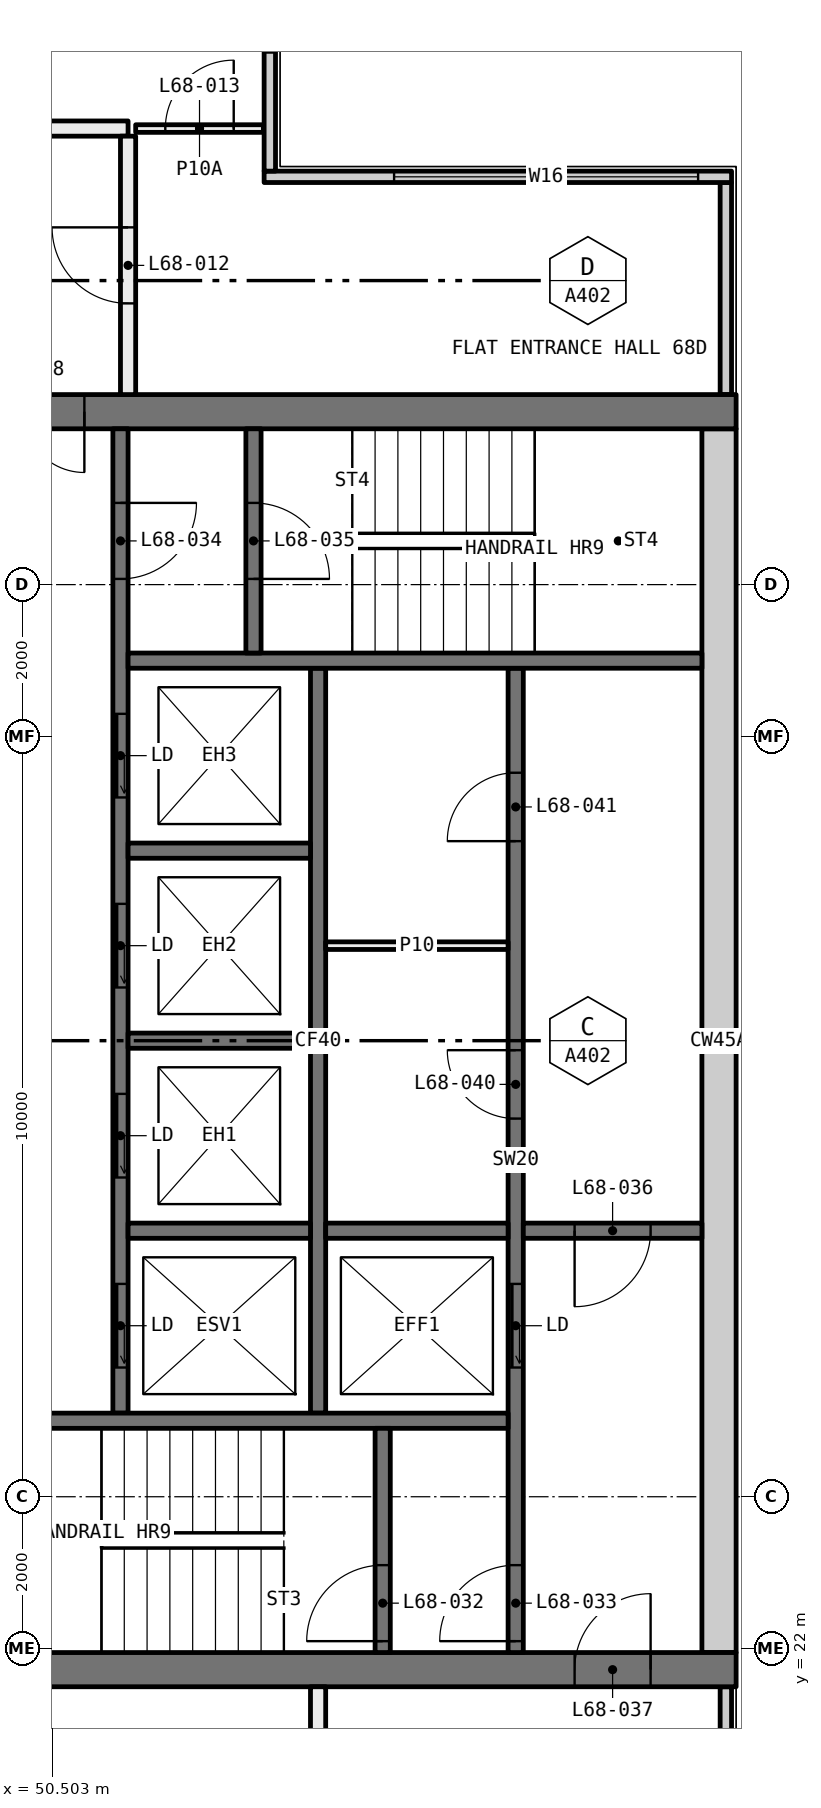
"""IFC4 building model, lengths in metres.
Left out: names, types, materials, properties, quantities, classifications, styles, units other than length and angle.
Written with IfcOpenShell. Run it as: python <this file> out.ifc"""

import sys

from ifc_helpers import new_model, si_unit, direction, frame, frame_2d, origin, place, context, subcontext, project, spatial, rectangle, extrude, element, fill, save


model = new_model("IFC4")
c1 = context("Model", 3, precision=1e-05, world=origin(), true_north=direction((0.0, 1.0)))
c2 = subcontext(c1, "Body", "Model", "MODEL_VIEW")
j1 = project(units=[si_unit("LENGTHUNIT", "METRE"), si_unit("PLANEANGLEUNIT", "RADIAN")], contexts=[c1])
p1 = place(None, origin())
s1 = spatial("IfcSite", under=j1, at=p1, CompositionType="ELEMENT")
p2 = place(p1, origin())
s2 = spatial("IfcBuilding", under=s1, at=p2, CompositionType="ELEMENT")
p3 = place(p2, frame((0.0, 0.0, 252.45)))
s3 = spatial("IfcBuildingStorey", under=s2, at=p3, CompositionType="ELEMENT", Elevation=252.45)
for number, where, z_axis, x_axis in (
    (1, (59.365, 18.71, 0.0), (0.0, 0.0, 1.0), (0.0, 1.0, 0.0)),
    (2, (59.365, 38.5, 0.0), (0.0, 0.0, 1.0), (0.0, 1.0, 0.0)),
):
    element("IfcWall", number, at=place(p3, frame(where, z_axis=z_axis, x_axis=x_axis)), inside=s3, PredefinedType="ELEMENTEDWALL", context=c2, shape_type="SweptSolid", body=[
        extrude(rectangle(XDim=2.79, YDim=0.15, at=frame_2d((1.395, 0.0))), origin(), (0.0, 0.0, 1.0), 3.05),
    ])
p4 = place(p3, frame((53.29, 41.365, 0.0), z_axis=(0.0, 0.0, 1.0), x_axis=(1.0, 0.0, 0.0)))
e3 = element("IfcWall", 3, at=p4, inside=s3, PredefinedType="ELEMENTEDWALL", context=c2, shape_type="SweptSolid", body=[
    extrude(rectangle(XDim=6.15, YDim=0.15, at=frame_2d((3.075, 0.0))), origin(), (0.0, 0.0, 1.0), 3.05),
])
p5 = place(p4, frame((1.71, 0.0, 0.45)))
e4 = element("IfcOpeningElement", 4, at=p5, cuts=e3, PredefinedType="OPENING", context=c2, shape_type="SweptSolid", body=[
    extrude(rectangle(XDim=4.0, YDim=2.55, at=frame_2d((2.0, 1.275))), frame((0.0, 0.085, 0.0), z_axis=(0.0, -1.0, 0.0), x_axis=(1.0, 0.0, 0.0)), (0.0, 0.0, 1.0), 0.17),
])
p6 = place(p3, frame((53.365, 41.44, 0.0), z_axis=(0.0, 0.0, 1.0), x_axis=(0.0, 1.0, 0.0)))
e5 = element("IfcWall", 5, at=p6, inside=s3, PredefinedType="ELEMENTEDWALL", context=c2, shape_type="SweptSolid", body=[
    extrude(rectangle(XDim=5.85, YDim=0.15, at=frame_2d((2.925, 0.0))), origin(), (0.0, 0.0, 1.0), 3.05),
])
p7 = place(p6, frame((1.56, 0.0, 0.45)))
e6 = element("IfcOpeningElement", 6, at=p7, cuts=e5, PredefinedType="OPENING", context=c2, shape_type="SweptSolid", body=[
    extrude(rectangle(XDim=4.0, YDim=2.55, at=frame_2d((2.0, 1.275))), frame((0.0, 0.085, 0.0), z_axis=(0.0, -1.0, 0.0), x_axis=(1.0, 0.0, 0.0)), (0.0, 0.0, 1.0), 0.17),
])
p8 = place(p3, frame((54.0, 18.72, 0.0), z_axis=(0.0, 0.0, 1.0), x_axis=(0.0, 1.0, 0.0)))
e7 = element("IfcWall", 7, at=p8, inside=s3, PredefinedType="PARTITIONING", context=c2, shape_type="SweptSolid", body=[
    extrude(rectangle(XDim=2.78, YDim=0.2, at=frame_2d((1.39, 0.0))), origin(), (0.0, 0.0, 1.0), 3.05),
])
p9 = place(p8, frame((0.89, 0.0, 0.0)))
e8 = element("IfcOpeningElement", 8, at=p9, cuts=e7, PredefinedType="OPENING", context=c2, shape_type="SweptSolid", body=[
    extrude(rectangle(XDim=1.0, YDim=2.1, at=frame_2d((0.5, 1.05))), frame((0.0, 0.11, 0.0), z_axis=(0.0, -1.0, 0.0), x_axis=(1.0, 0.0, 0.0)), (0.0, 0.0, 1.0), 0.22),
])
p10 = place(p3, frame((51.6, 42.0, 0.0), z_axis=(0.0, 0.0, 1.0), x_axis=(1.0, 0.0, 0.0)))
e9 = element("IfcWall", 9, at=p10, inside=s3, PredefinedType="PARTITIONING", context=c2, shape_type="SweptSolid", body=[
    extrude(rectangle(XDim=1.68, YDim=0.1, at=frame_2d((0.84, 0.0))), origin(), (0.0, 0.0, 1.0), 3.05),
])
p11 = place(p10, frame((0.39, 0.0, 0.0)))
e10 = element("IfcOpeningElement", 10, at=p11, cuts=e9, PredefinedType="OPENING", context=c2, shape_type="SweptSolid", body=[
    extrude(rectangle(XDim=0.9, YDim=2.1, at=frame_2d((0.45, 1.05))), frame((0.0, 0.06, 0.0), z_axis=(0.0, -1.0, 0.0), x_axis=(1.0, 0.0, 0.0)), (0.0, 0.0, 1.0), 0.12),
])
p12 = place(p3, frame((48.0, 42.0, 0.0), z_axis=(0.0, 0.0, 1.0), x_axis=(1.0, 0.0, 0.0)))
e11 = element("IfcWall", 11, at=p12, inside=s3, PredefinedType="PARTITIONING", context=c2, shape_type="SweptSolid", body=[
    extrude(rectangle(XDim=3.5, YDim=0.2, at=frame_2d((1.75, 0.0))), origin(), (0.0, 0.0, 1.0), 3.05),
])
p13 = place(p3, frame((51.5, 41.9, 0.0), z_axis=(0.0, 0.0, 1.0), x_axis=(0.0, -1.0, 0.0)))
e12 = element("IfcWall", 12, at=p13, inside=s3, PredefinedType="PARTITIONING", context=c2, shape_type="SweptSolid", body=[
    extrude(rectangle(XDim=3.4, YDim=0.2, at=frame_2d((1.7, 0.0))), origin(), (0.0, 0.0, 1.0), 3.05),
])
p14 = place(p13, frame((1.2, 0.0, 0.0)))
e13 = element("IfcOpeningElement", 13, at=p14, cuts=e12, PredefinedType="OPENING", context=c2, shape_type="SweptSolid", body=[
    extrude(rectangle(XDim=1.0, YDim=2.1, at=frame_2d((0.5, 1.05))), frame((0.0, 0.11, 0.0), z_axis=(0.0, -1.0, 0.0), x_axis=(1.0, 0.0, 0.0)), (0.0, 0.0, 1.0), 0.22),
])
p15 = place(p3, frame((59.5, 21.725, 0.0), z_axis=(0.0, 0.0, 1.0), x_axis=(-1.0, 0.0, 0.0)))
e14 = element("IfcWall", 14, at=p15, inside=s3, PredefinedType="SHEAR", context=c2, shape_type="SweptSolid", body=[
    extrude(rectangle(XDim=11.0, YDim=0.45, at=frame_2d((5.5, 0.0))), origin(), (0.0, 0.0, 1.0), 3.05),
])
p16 = place(p15, frame((1.125, 0.0, 0.0)))
e15 = element("IfcOpeningElement", 15, at=p16, cuts=e14, PredefinedType="OPENING", context=c2, shape_type="SweptSolid", body=[
    extrude(rectangle(XDim=1.0, YDim=2.1, at=frame_2d((0.5, 1.05))), frame((0.0, 0.235, 0.0), z_axis=(0.0, -1.0, 0.0), x_axis=(1.0, 0.0, 0.0)), (0.0, 0.0, 1.0), 0.47),
])
p17 = place(p3, frame((59.5, 38.275, 0.0), z_axis=(0.0, 0.0, 1.0), x_axis=(-1.0, 0.0, 0.0)))
e16 = element("IfcWall", 16, at=p17, inside=s3, PredefinedType="SHEAR", context=c2, shape_type="SweptSolid", body=[
    extrude(rectangle(XDim=11.0, YDim=0.45, at=frame_2d((5.5, 0.0))), origin(), (0.0, 0.0, 1.0), 3.05),
])
p18 = place(p17, frame((8.575, 0.0, 0.0)))
e17 = element("IfcOpeningElement", 17, at=p18, cuts=e16, PredefinedType="OPENING", context=c2, shape_type="SweptSolid", body=[
    extrude(rectangle(XDim=1.6, YDim=2.1, at=frame_2d((0.8, 1.05))), frame((0.0, 0.235, 0.0), z_axis=(0.0, -1.0, 0.0), x_axis=(1.0, 0.0, 0.0)), (0.0, 0.0, 1.0), 0.47),
])
p19 = place(p3, frame((59.275, 21.95, 0.0), z_axis=(0.0, 0.0, 1.0), x_axis=(0.0, 1.0, 0.0)))
e18 = element("IfcWall", 18, at=p19, inside=s3, PredefinedType="SHEAR", context=c2, shape_type="SweptSolid", body=[
    extrude(rectangle(XDim=16.1, YDim=0.45, at=frame_2d((8.05, 0.0))), origin(), (0.0, 0.0, 1.0), 3.05),
])
p20 = place(p3, frame((56.6, 21.95, 0.0), z_axis=(0.0, 0.0, 1.0), x_axis=(0.0, 1.0, 0.0)))
e19 = element("IfcWall", 19, at=p20, inside=s3, PredefinedType="SOLIDWALL", context=c2, shape_type="SweptSolid", body=[
    extrude(rectangle(XDim=12.95, YDim=0.2, at=frame_2d((6.475, 0.0))), origin(), (0.0, 0.0, 1.0), 3.05),
])
p21 = place(p20, frame((3.75, 0.0, 0.0)))
e20 = element("IfcOpeningElement", 20, at=p21, cuts=e19, PredefinedType="OPENING", context=c2, shape_type="SweptSolid", body=[
    extrude(rectangle(XDim=1.1, YDim=2.1, at=frame_2d((0.55, 1.05))), frame((0.0, 0.11, 0.0), z_axis=(0.0, -1.0, 0.0), x_axis=(1.0, 0.0, 0.0)), (0.0, 0.0, 1.0), 0.22),
])
p22 = place(p20, frame((0.15, 0.0, 0.0)))
e21 = element("IfcOpeningElement", 21, at=p22, cuts=e19, PredefinedType="OPENING", context=c2, shape_type="SweptSolid", body=[
    extrude(rectangle(XDim=1.0, YDim=2.1, at=frame_2d((0.5, 1.05))), frame((0.0, 0.11, 0.0), z_axis=(0.0, -1.0, 0.0), x_axis=(1.0, 0.0, 0.0)), (0.0, 0.0, 1.0), 0.22),
])
p23 = place(p20, frame((7.025, 0.0, 0.0)))
e22 = element("IfcOpeningElement", 22, at=p23, cuts=e19, PredefinedType="OPENING", context=c2, shape_type="SweptSolid", body=[
    extrude(rectangle(XDim=0.9, YDim=2.1, at=frame_2d((0.45, 1.05))), frame((0.0, 0.11, 0.0), z_axis=(0.0, -1.0, 0.0), x_axis=(1.0, 0.0, 0.0)), (0.0, 0.0, 1.0), 0.22),
])
p24 = place(p20, frame((10.675, 0.0, 0.0)))
e23 = element("IfcOpeningElement", 23, at=p24, cuts=e19, PredefinedType="OPENING", context=c2, shape_type="SweptSolid", body=[
    extrude(rectangle(XDim=0.9, YDim=2.1, at=frame_2d((0.45, 1.05))), frame((0.0, 0.11, 0.0), z_axis=(0.0, -1.0, 0.0), x_axis=(1.0, 0.0, 0.0)), (0.0, 0.0, 1.0), 0.22),
])
p25 = place(p3, frame((51.4, 25.1, 0.0), z_axis=(0.0, 0.0, 1.0), x_axis=(0.0, 1.0, 0.0)))
e24 = element("IfcWall", 24, at=p25, inside=s3, PredefinedType="SOLIDWALL", context=c2, shape_type="SweptSolid", body=[
    extrude(rectangle(XDim=12.95, YDim=0.2, at=frame_2d((6.475, 0.0))), origin(), (0.0, 0.0, 1.0), 3.05),
])
p26 = place(p25, frame((0.6, 0.0, 0.0)))
e25 = element("IfcOpeningElement", 25, at=p26, cuts=e24, PredefinedType="OPENING", context=c2, shape_type="SweptSolid", body=[
    extrude(rectangle(XDim=1.1, YDim=2.1, at=frame_2d((0.55, 1.05))), frame((0.0, 0.11, 0.0), z_axis=(0.0, -1.0, 0.0), x_axis=(1.0, 0.0, 0.0)), (0.0, 0.0, 1.0), 0.22),
])
p27 = place(p25, frame((3.1, 0.0, 0.0)))
e26 = element("IfcOpeningElement", 26, at=p27, cuts=e24, PredefinedType="OPENING", context=c2, shape_type="SweptSolid", body=[
    extrude(rectangle(XDim=1.1, YDim=2.1, at=frame_2d((0.55, 1.05))), frame((0.0, 0.11, 0.0), z_axis=(0.0, -1.0, 0.0), x_axis=(1.0, 0.0, 0.0)), (0.0, 0.0, 1.0), 0.22),
])
p28 = place(p25, frame((5.6, 0.0, 0.0)))
e27 = element("IfcOpeningElement", 27, at=p28, cuts=e24, PredefinedType="OPENING", context=c2, shape_type="SweptSolid", body=[
    extrude(rectangle(XDim=1.1, YDim=2.1, at=frame_2d((0.55, 1.05))), frame((0.0, 0.11, 0.0), z_axis=(0.0, -1.0, 0.0), x_axis=(1.0, 0.0, 0.0)), (0.0, 0.0, 1.0), 0.22),
])
p29 = place(p25, frame((8.1, 0.0, 0.0)))
e28 = element("IfcOpeningElement", 28, at=p29, cuts=e24, PredefinedType="OPENING", context=c2, shape_type="SweptSolid", body=[
    extrude(rectangle(XDim=1.1, YDim=2.1, at=frame_2d((0.55, 1.05))), frame((0.0, 0.11, 0.0), z_axis=(0.0, -1.0, 0.0), x_axis=(1.0, 0.0, 0.0)), (0.0, 0.0, 1.0), 0.22),
])
p30 = place(p25, frame((10.975, 0.0, 0.0)))
e29 = element("IfcOpeningElement", 29, at=p30, cuts=e24, PredefinedType="OPENING", context=c2, shape_type="SweptSolid", body=[
    extrude(rectangle(XDim=1.0, YDim=2.1, at=frame_2d((0.5, 1.05))), frame((0.0, 0.11, 0.0), z_axis=(0.0, -1.0, 0.0), x_axis=(1.0, 0.0, 0.0)), (0.0, 0.0, 1.0), 0.22),
])
p31 = place(p3, frame((54.0, 25.1, 0.0), z_axis=(0.0, 0.0, 1.0), x_axis=(0.0, 1.0, 0.0)))
e30 = element("IfcWall", 30, at=p31, inside=s3, PredefinedType="SOLIDWALL", context=c2, shape_type="SweptSolid", body=[
    extrude(rectangle(XDim=9.8, YDim=0.2, at=frame_2d((4.9, 0.0))), origin(), (0.0, 0.0, 1.0), 3.05),
])
for number, where, z_axis, x_axis in (
    (31, (56.5, 25.0, 0.0), (0.0, 0.0, 1.0), (-1.0, 0.0, 0.0)),
    (32, (59.05, 35.0, 0.0), (0.0, 0.0, 1.0), (-1.0, 0.0, 0.0)),
):
    element("IfcWall", number, at=place(p3, frame(where, z_axis=z_axis, x_axis=x_axis)), inside=s3, PredefinedType="SOLIDWALL", context=c2, shape_type="SweptSolid", body=[
        extrude(rectangle(XDim=7.55, YDim=0.2, at=frame_2d((3.775, 0.0))), origin(), (0.0, 0.0, 1.0), 3.05),
    ])
p32 = place(p3, frame((59.05, 27.5, 0.0), z_axis=(0.0, 0.0, 1.0), x_axis=(-1.0, 0.0, 0.0)))
e33 = element("IfcWall", 33, at=p32, inside=s3, PredefinedType="SOLIDWALL", context=c2, shape_type="SweptSolid", body=[
    extrude(rectangle(XDim=2.35, YDim=0.2, at=frame_2d((1.175, 0.0))), origin(), (0.0, 0.0, 1.0), 3.05),
])
p33 = place(p32, frame((0.675, 0.0, 0.0)))
e34 = element("IfcOpeningElement", 34, at=p33, cuts=e33, PredefinedType="OPENING", context=c2, shape_type="SweptSolid", body=[
    extrude(rectangle(XDim=1.0, YDim=2.1, at=frame_2d((0.5, 1.05))), frame((0.0, 0.11, 0.0), z_axis=(0.0, -1.0, 0.0), x_axis=(1.0, 0.0, 0.0)), (0.0, 0.0, 1.0), 0.22),
])
p34 = place(p3, frame((54.85, 21.95, 0.0), z_axis=(0.0, 0.0, 1.0), x_axis=(0.0, 1.0, 0.0)))
e35 = element("IfcWall", 35, at=p34, inside=s3, PredefinedType="SOLIDWALL", context=c2, shape_type="SweptSolid", body=[
    extrude(rectangle(XDim=2.95, YDim=0.2, at=frame_2d((1.475, 0.0))), origin(), (0.0, 0.0, 1.0), 3.05),
])
p35 = place(p34, frame((0.15, 0.0, 0.0)))
e36 = element("IfcOpeningElement", 36, at=p35, cuts=e35, PredefinedType="OPENING", context=c2, shape_type="SweptSolid", body=[
    extrude(rectangle(XDim=1.0, YDim=2.1, at=frame_2d((0.5, 1.05))), frame((0.0, 0.11, 0.0), z_axis=(0.0, -1.0, 0.0), x_axis=(1.0, 0.0, 0.0)), (0.0, 0.0, 1.0), 0.22),
])
p36 = place(p3, frame((53.15, 35.1, 0.0), z_axis=(0.0, 0.0, 1.0), x_axis=(0.0, 1.0, 0.0)))
e37 = element("IfcWall", 37, at=p36, inside=s3, PredefinedType="SOLIDWALL", context=c2, shape_type="SweptSolid", body=[
    extrude(rectangle(XDim=2.95, YDim=0.2, at=frame_2d((1.475, 0.0))), origin(), (0.0, 0.0, 1.0), 3.05),
])
p37 = place(p36, frame((0.975, 0.0, 0.0)))
e38 = element("IfcOpeningElement", 38, at=p37, cuts=e37, PredefinedType="OPENING", context=c2, shape_type="SweptSolid", body=[
    extrude(rectangle(XDim=1.0, YDim=2.1, at=frame_2d((0.5, 1.05))), frame((0.0, 0.11, 0.0), z_axis=(0.0, -1.0, 0.0), x_axis=(1.0, 0.0, 0.0)), (0.0, 0.0, 1.0), 0.22),
])
for number, where, z_axis, x_axis in (
    (39, (56.5, 27.5, 0.0), (0.0, 0.0, 1.0), (-1.0, 0.0, 0.0)),
    (40, (53.9, 27.5, 0.0), (0.0, 0.0, 1.0), (-1.0, 0.0, 0.0)),
    (41, (53.9, 30.0, 0.0), (0.0, 0.0, 1.0), (-1.0, 0.0, 0.0)),
    (42, (53.9, 32.5, 0.0), (0.0, 0.0, 1.0), (-1.0, 0.0, 0.0)),
):
    element("IfcWall", number, at=place(p3, frame(where, z_axis=z_axis, x_axis=x_axis)), inside=s3, PredefinedType="SOLIDWALL", context=c2, shape_type="SweptSolid", body=[
        extrude(rectangle(XDim=2.4, YDim=0.2, at=frame_2d((1.2, 0.0))), origin(), (0.0, 0.0, 1.0), 3.05),
    ])
p38 = place(p3, frame((56.5, 31.25, 0.0), z_axis=(0.0, 0.0, 1.0), x_axis=(-1.0, 0.0, 0.0)))
e43 = element("IfcWall", 43, at=p38, inside=s3, PredefinedType="PARTITIONING", context=c2, shape_type="SweptSolid", body=[
    extrude(rectangle(XDim=2.4, YDim=0.1, at=frame_2d((1.2, 0.0))), origin(), (0.0, 0.0, 1.0), 3.05),
])
p39 = place(p5, origin())
e44 = element("IfcWindow", 44, at=p39, inside=s3, PartitioningType="SINGLE_PANEL", PredefinedType="WINDOW", context=c2, shape_type="SweptSolid", body=[
    extrude(rectangle(XDim=4.0, YDim=2.55, at=frame_2d((2.0, 1.275))), frame((0.0, 0.03, 0.0), z_axis=(0.0, -1.0, 0.0), x_axis=(1.0, 0.0, 0.0)), (0.0, 0.0, 1.0), 0.06),
])
fill(e4, e44)
p40 = place(p14, frame((1.0, 0.0, 0.0), x_axis=(-1.0, 0.0, 0.0)))
e45 = element("IfcDoor", 45, at=p40, inside=s3, OperationType="SINGLE_SWING_LEFT", PredefinedType="DOOR", context=c2, shape_type="SweptSolid", body=[
    extrude(rectangle(XDim=1.0, YDim=2.1, at=frame_2d((0.5, 1.05))), frame((0.0, 0.025, 0.0), z_axis=(0.0, -1.0, 0.0), x_axis=(1.0, 0.0, 0.0)), (0.0, 0.0, 1.0), 0.05),
])
fill(e13, e45)
p41 = place(p11, origin())
e46 = element("IfcDoor", 46, at=p41, inside=s3, OperationType="SINGLE_SWING_LEFT", PredefinedType="DOOR", context=c2, shape_type="SweptSolid", body=[
    extrude(rectangle(XDim=0.9, YDim=2.1, at=frame_2d((0.45, 1.05))), frame((0.0, 0.025, 0.0), z_axis=(0.0, -1.0, 0.0), x_axis=(1.0, 0.0, 0.0)), (0.0, 0.0, 1.0), 0.05),
])
fill(e10, e46)
p42 = place(p26, origin())
e47 = element("IfcDoor", 47, at=p42, inside=s3, OperationType="SLIDING_TO_LEFT", PredefinedType="DOOR", context=c2, shape_type="SweptSolid", body=[
    extrude(rectangle(XDim=1.1, YDim=2.1, at=frame_2d((0.55, 1.05))), frame((0.0, 0.025, 0.0), z_axis=(0.0, -1.0, 0.0), x_axis=(1.0, 0.0, 0.0)), (0.0, 0.0, 1.0), 0.05),
])
fill(e25, e47)
p43 = place(p27, origin())
e48 = element("IfcDoor", 48, at=p43, inside=s3, OperationType="SLIDING_TO_LEFT", PredefinedType="DOOR", context=c2, shape_type="SweptSolid", body=[
    extrude(rectangle(XDim=1.1, YDim=2.1, at=frame_2d((0.55, 1.05))), frame((0.0, 0.025, 0.0), z_axis=(0.0, -1.0, 0.0), x_axis=(1.0, 0.0, 0.0)), (0.0, 0.0, 1.0), 0.05),
])
fill(e26, e48)
p44 = place(p28, origin())
e49 = element("IfcDoor", 49, at=p44, inside=s3, OperationType="SLIDING_TO_LEFT", PredefinedType="DOOR", context=c2, shape_type="SweptSolid", body=[
    extrude(rectangle(XDim=1.1, YDim=2.1, at=frame_2d((0.55, 1.05))), frame((0.0, 0.025, 0.0), z_axis=(0.0, -1.0, 0.0), x_axis=(1.0, 0.0, 0.0)), (0.0, 0.0, 1.0), 0.05),
])
fill(e27, e49)
p45 = place(p29, origin())
e50 = element("IfcDoor", 50, at=p45, inside=s3, OperationType="SLIDING_TO_LEFT", PredefinedType="DOOR", context=c2, shape_type="SweptSolid", body=[
    extrude(rectangle(XDim=1.1, YDim=2.1, at=frame_2d((0.55, 1.05))), frame((0.0, 0.025, 0.0), z_axis=(0.0, -1.0, 0.0), x_axis=(1.0, 0.0, 0.0)), (0.0, 0.0, 1.0), 0.05),
])
fill(e28, e50)
p46 = place(p21, origin())
e51 = element("IfcDoor", 51, at=p46, inside=s3, OperationType="SLIDING_TO_LEFT", PredefinedType="DOOR", context=c2, shape_type="SweptSolid", body=[
    extrude(rectangle(XDim=1.1, YDim=2.1, at=frame_2d((0.55, 1.05))), frame((0.0, 0.025, 0.0), z_axis=(0.0, -1.0, 0.0), x_axis=(1.0, 0.0, 0.0)), (0.0, 0.0, 1.0), 0.05),
])
fill(e20, e51)
p47 = place(p35, origin())
e52 = element("IfcDoor", 52, at=p47, inside=s3, OperationType="SINGLE_SWING_RIGHT", PredefinedType="DOOR", context=c2, shape_type="SweptSolid", body=[
    extrude(rectangle(XDim=1.0, YDim=2.1, at=frame_2d((0.5, 1.05))), frame((0.0, 0.025, 0.0), z_axis=(0.0, -1.0, 0.0), x_axis=(1.0, 0.0, 0.0)), (0.0, 0.0, 1.0), 0.05),
])
fill(e36, e52)
p48 = place(p22, origin())
e53 = element("IfcDoor", 53, at=p48, inside=s3, OperationType="SINGLE_SWING_RIGHT", PredefinedType="DOOR", context=c2, shape_type="SweptSolid", body=[
    extrude(rectangle(XDim=1.0, YDim=2.1, at=frame_2d((0.5, 1.05))), frame((0.0, 0.025, 0.0), z_axis=(0.0, -1.0, 0.0), x_axis=(1.0, 0.0, 0.0)), (0.0, 0.0, 1.0), 0.05),
])
fill(e21, e53)
p49 = place(p30, frame((1.0, 0.0, 0.0), x_axis=(-1.0, 0.0, 0.0)))
e54 = element("IfcDoor", 54, at=p49, inside=s3, OperationType="SINGLE_SWING_RIGHT", PredefinedType="DOOR", context=c2, shape_type="SweptSolid", body=[
    extrude(rectangle(XDim=1.0, YDim=2.1, at=frame_2d((0.5, 1.05))), frame((0.0, 0.025, 0.0), z_axis=(0.0, -1.0, 0.0), x_axis=(1.0, 0.0, 0.0)), (0.0, 0.0, 1.0), 0.05),
])
fill(e29, e54)
p50 = place(p37, frame((1.0, 0.0, 0.0), x_axis=(-1.0, 0.0, 0.0)))
e55 = element("IfcDoor", 55, at=p50, inside=s3, OperationType="SINGLE_SWING_LEFT", PredefinedType="DOOR", context=c2, shape_type="SweptSolid", body=[
    extrude(rectangle(XDim=1.0, YDim=2.1, at=frame_2d((0.5, 1.05))), frame((0.0, 0.025, 0.0), z_axis=(0.0, -1.0, 0.0), x_axis=(1.0, 0.0, 0.0)), (0.0, 0.0, 1.0), 0.05),
])
fill(e38, e55)
p51 = place(p33, origin())
e56 = element("IfcDoor", 56, at=p51, inside=s3, OperationType="SINGLE_SWING_LEFT", PredefinedType="DOOR", context=c2, shape_type="SweptSolid", body=[
    extrude(rectangle(XDim=1.0, YDim=2.1, at=frame_2d((0.5, 1.05))), frame((0.0, 0.025, 0.0), z_axis=(0.0, -1.0, 0.0), x_axis=(1.0, 0.0, 0.0)), (0.0, 0.0, 1.0), 0.05),
])
fill(e34, e56)
p52 = place(p16, frame((1.0, 0.0, 0.0), x_axis=(-1.0, 0.0, 0.0)))
e57 = element("IfcDoor", 57, at=p52, inside=s3, OperationType="SINGLE_SWING_LEFT", PredefinedType="DOOR", context=c2, shape_type="SweptSolid", body=[
    extrude(rectangle(XDim=1.0, YDim=2.1, at=frame_2d((0.5, 1.05))), frame((0.0, 0.025, 0.0), z_axis=(0.0, -1.0, 0.0), x_axis=(1.0, 0.0, 0.0)), (0.0, 0.0, 1.0), 0.05),
])
fill(e15, e57)
p53 = place(p18, origin())
e58 = element("IfcDoor", 58, at=p53, inside=s3, OperationType="DOUBLE_DOOR_SINGLE_SWING", PredefinedType="DOOR", context=c2, shape_type="SweptSolid", body=[
    extrude(rectangle(XDim=1.6, YDim=2.1, at=frame_2d((0.8, 1.05))), frame((0.0, 0.025, 0.0), z_axis=(0.0, -1.0, 0.0), x_axis=(1.0, 0.0, 0.0)), (0.0, 0.0, 1.0), 0.05),
])
fill(e17, e58)
p54 = place(p23, origin())
e59 = element("IfcDoor", 59, at=p54, inside=s3, OperationType="SINGLE_SWING_LEFT", PredefinedType="DOOR", context=c2, shape_type="SweptSolid", body=[
    extrude(rectangle(XDim=0.9, YDim=2.1, at=frame_2d((0.45, 1.05))), frame((0.0, 0.025, 0.0), z_axis=(0.0, -1.0, 0.0), x_axis=(1.0, 0.0, 0.0)), (0.0, 0.0, 1.0), 0.05),
])
fill(e22, e59)
p55 = place(p24, origin())
e60 = element("IfcDoor", 60, at=p55, inside=s3, OperationType="SINGLE_SWING_RIGHT", PredefinedType="DOOR", context=c2, shape_type="SweptSolid", body=[
    extrude(rectangle(XDim=0.9, YDim=2.1, at=frame_2d((0.45, 1.05))), frame((0.0, 0.025, 0.0), z_axis=(0.0, -1.0, 0.0), x_axis=(1.0, 0.0, 0.0)), (0.0, 0.0, 1.0), 0.05),
])
fill(e23, e60)
save(model, sys.argv[1])
